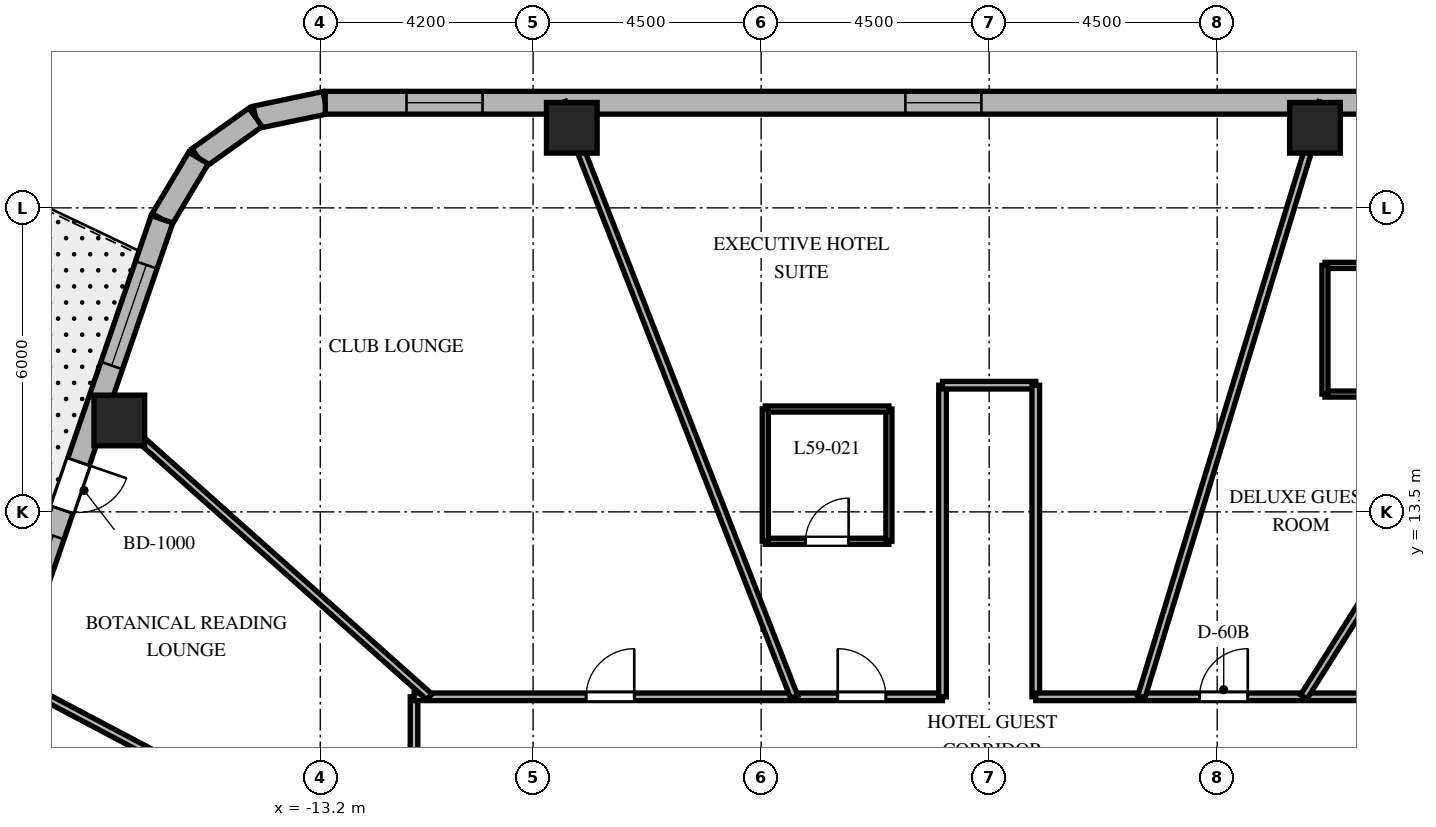
"""IFC4 building model, lengths in metres.
Left out: names, types, materials, properties, quantities, classifications, styles, units other than length and angle.
Written with IfcOpenShell. Run it as: python <this file> out.ifc"""

import sys

from ifc_helpers import new_model, si_unit, direction, frame, frame_2d, origin, origin_2d, place, context, subcontext, project, spatial, rectangle, extrude, element, fill, save


model = new_model("IFC4")
c1 = context("Model", 3, precision=1e-05, world=origin(), true_north=direction((0.0, 1.0)))
c2 = subcontext(c1, "Body", "Model", "MODEL_VIEW")
j1 = project(units=[si_unit("LENGTHUNIT", "METRE"), si_unit("PLANEANGLEUNIT", "RADIAN")], contexts=[c1])
p1 = place(None, origin())
s1 = spatial("IfcSite", under=j1, at=p1, CompositionType="ELEMENT")
p2 = place(p1, origin())
s2 = spatial("IfcBuilding", under=s1, at=p2, CompositionType="ELEMENT")
p3 = place(p2, frame((0.0, 0.0, 236.9)))
s3 = spatial("IfcBuildingStorey", under=s2, at=p3, CompositionType="ELEMENT", Elevation=236.9)
for number, where, z_axis, x_axis in (
    (1, (6.43, 21.08, 0.0), (0.0, 0.0, 1.0), (1.0, 0.0, 0.0)),
    (2, (-8.236, 21.08, 0.0), (0.0, 0.0, 1.0), (1.0, 0.0, 0.0)),
    (3, (-17.166, 15.304, 0.0), (0.0, 0.0, 1.0), (1.0, 0.0, 0.0)),
):
    element("IfcColumn", number, at=place(p3, frame(where, z_axis=z_axis, x_axis=x_axis)), inside=s3, PredefinedType="COLUMN", context=c2, shape_type="SweptSolid", body=[
        extrude(rectangle(XDim=1.0, YDim=1.0, at=origin_2d()), origin(), (0.0, 0.0, 1.0), 3.8),
    ])
p4 = place(p3, frame((-13.102, 21.575, 0.0), z_axis=(0.0, 0.0, 1.0), x_axis=(-0.978757421505, -0.205021730188, 0.0)))
e4 = element("IfcWall", 4, at=p4, inside=s3, PredefinedType="SOLIDWALL", context=c2, shape_type="SweptSolid", body=[
    extrude(rectangle(XDim=1.406, YDim=0.45, at=frame_2d((0.703, 0.0))), origin(), (0.0, 0.0, 1.0), 3.5),
])
p5 = place(p3, frame((-14.478, 21.287, 0.0), z_axis=(0.0, 0.0, 1.0), x_axis=(-0.813888518617, -0.58102106611, 0.0)))
e5 = element("IfcWall", 5, at=p5, inside=s3, PredefinedType="SOLIDWALL", context=c2, shape_type="SweptSolid", body=[
    extrude(rectangle(XDim=1.383, YDim=0.45, at=frame_2d((0.691, 0.0))), origin(), (0.0, 0.0, 1.0), 3.5),
])
p6 = place(p3, frame((-15.604, 20.483, 0.0), z_axis=(0.0, 0.0, 1.0), x_axis=(-0.512222149036, -0.858852996756, 0.0)))
e6 = element("IfcWall", 6, at=p6, inside=s3, PredefinedType="SOLIDWALL", context=c2, shape_type="SweptSolid", body=[
    extrude(rectangle(XDim=1.406, YDim=0.45, at=frame_2d((0.703, 0.0))), origin(), (0.0, 0.0, 1.0), 3.5),
])
p7 = place(p3, frame((11.298, 21.575, 0.0), z_axis=(0.0, 0.0, 1.0), x_axis=(-1.0, 0.0, 0.0)))
e7 = element("IfcWall", 7, at=p7, inside=s3, PredefinedType="SOLIDWALL", context=c2, shape_type="SweptSolid", body=[
    extrude(rectangle(XDim=24.399, YDim=0.45, at=frame_2d((12.2, 0.0))), origin(), (0.0, 0.0, 1.0), 3.5),
])
p8 = place(p7, frame((1.604, 0.0, 0.8)))
e8 = element("IfcOpeningElement", 8, at=p8, cuts=e7, PredefinedType="OPENING", context=c2, shape_type="SweptSolid", body=[
    extrude(rectangle(XDim=1.5, YDim=1.8, at=frame_2d((0.75, 0.9))), frame((0.0, 0.235, 0.0), z_axis=(0.0, -1.0, 0.0), x_axis=(1.0, 0.0, 0.0)), (0.0, 0.0, 1.0), 0.47),
])
p9 = place(p7, frame((11.451, 0.0, 0.8)))
e9 = element("IfcOpeningElement", 9, at=p9, cuts=e7, PredefinedType="OPENING", context=c2, shape_type="SweptSolid", body=[
    extrude(rectangle(XDim=1.5, YDim=1.8, at=frame_2d((0.75, 0.9))), frame((0.0, 0.235, 0.0), z_axis=(0.0, -1.0, 0.0), x_axis=(1.0, 0.0, 0.0)), (0.0, 0.0, 1.0), 0.47),
])
p10 = place(p7, frame((21.296, 0.0, 0.8)))
e10 = element("IfcOpeningElement", 10, at=p10, cuts=e7, PredefinedType="OPENING", context=c2, shape_type="SweptSolid", body=[
    extrude(rectangle(XDim=1.5, YDim=1.8, at=frame_2d((0.75, 0.9))), frame((0.0, 0.235, 0.0), z_axis=(0.0, -1.0, 0.0), x_axis=(1.0, 0.0, 0.0)), (0.0, 0.0, 1.0), 0.47),
])
p11 = place(p3, frame((-16.324, 19.275, 0.0), z_axis=(0.0, 0.0, 1.0), x_axis=(-0.325083142304, -0.945685439557, 0.0)))
e11 = element("IfcWall", 11, at=p11, inside=s3, PredefinedType="SOLIDWALL", context=c2, shape_type="SweptSolid", body=[
    extrude(rectangle(XDim=20.224, YDim=0.45, at=frame_2d((10.112, 0.0))), origin(), (0.0, 0.0, 1.0), 3.5),
])
p12 = place(p11, frame((5.062, 0.0, 0.0)))
e12 = element("IfcOpeningElement", 12, at=p12, cuts=e11, PredefinedType="OPENING", context=c2, shape_type="SweptSolid", body=[
    extrude(rectangle(XDim=1.0, YDim=2.15, at=frame_2d((0.5, 1.075))), frame((0.0, 0.235, 0.0), z_axis=(0.0, -1.0, 0.0), x_axis=(1.0, 0.0, 0.0)), (0.0, 0.0, 1.0), 0.47),
])
p13 = place(p11, frame((0.953, 0.0, 0.8)))
e13 = element("IfcOpeningElement", 13, at=p13, cuts=e11, PredefinedType="OPENING", context=c2, shape_type="SweptSolid", body=[
    extrude(rectangle(XDim=2.1, YDim=1.85, at=frame_2d((1.05, 0.925))), frame((0.0, 0.235, 0.0), z_axis=(0.0, -1.0, 0.0), x_axis=(1.0, 0.0, 0.0)), (0.0, 0.0, 1.0), 0.47),
])
p14 = place(p11, frame((6.604, 0.0, 0.8)))
e14 = element("IfcOpeningElement", 14, at=p14, cuts=e11, PredefinedType="OPENING", context=c2, shape_type="SweptSolid", body=[
    extrude(rectangle(XDim=2.1, YDim=1.85, at=frame_2d((1.05, 0.925))), frame((0.0, 0.235, 0.0), z_axis=(0.0, -1.0, 0.0), x_axis=(1.0, 0.0, 0.0)), (0.0, 0.0, 1.0), 0.47),
])
p15 = place(p11, frame((11.585, 0.0, 0.8)))
e15 = element("IfcOpeningElement", 15, at=p15, cuts=e11, PredefinedType="OPENING", context=c2, shape_type="SweptSolid", body=[
    extrude(rectangle(XDim=2.1, YDim=1.85, at=frame_2d((1.05, 0.925))), frame((0.0, 0.235, 0.0), z_axis=(0.0, -1.0, 0.0), x_axis=(1.0, 0.0, 0.0)), (0.0, 0.0, 1.0), 0.47),
])
p16 = place(p11, frame((17.118, 0.0, 0.8)))
e16 = element("IfcOpeningElement", 16, at=p16, cuts=e11, PredefinedType="OPENING", context=c2, shape_type="SweptSolid", body=[
    extrude(rectangle(XDim=2.1, YDim=1.85, at=frame_2d((1.05, 0.925))), frame((0.0, 0.235, 0.0), z_axis=(0.0, -1.0, 0.0), x_axis=(1.0, 0.0, 0.0)), (0.0, 0.0, 1.0), 0.47),
])
p17 = place(p3, frame((-11.35, 4.4, 0.0), z_axis=(0.0, 0.0, 1.0), x_axis=(0.0, 1.0, 0.0)))
e17 = element("IfcWall", 17, at=p17, inside=s3, PredefinedType="PARTITIONING", context=c2, shape_type="SweptSolid", body=[
    extrude(rectangle(XDim=5.45, YDim=0.15, at=frame_2d((2.725, 0.0))), origin(), (0.0, 0.0, 1.0), 2.99),
])
p18 = place(p17, frame((2.955, 0.0, 0.0)))
e18 = element("IfcOpeningElement", 18, at=p18, cuts=e17, PredefinedType="OPENING", context=c2, shape_type="SweptSolid", body=[
    extrude(rectangle(XDim=0.9, YDim=2.03, at=frame_2d((0.45, 1.015))), frame((0.0, 0.085, 0.0), z_axis=(0.0, -1.0, 0.0), x_axis=(1.0, 0.0, 0.0)), (0.0, 0.0, 1.0), 0.17),
])
p19 = place(p3, frame((-11.35, 9.85, 0.0), z_axis=(0.0, 0.0, 1.0), x_axis=(1.0, 0.0, 0.0)))
e19 = element("IfcWall", 19, at=p19, inside=s3, PredefinedType="PARTITIONING", context=c2, shape_type="SweptSolid", body=[
    extrude(rectangle(XDim=10.43, YDim=0.15, at=frame_2d((5.215, 0.0))), origin(), (0.0, 0.0, 1.0), 2.99),
])
p20 = place(p19, frame((8.362, 0.0, 0.0)))
e20 = element("IfcOpeningElement", 20, at=p20, cuts=e19, PredefinedType="OPENING", context=c2, shape_type="SweptSolid", body=[
    extrude(rectangle(XDim=0.95, YDim=2.03, at=frame_2d((0.475, 1.015))), frame((0.0, 0.085, 0.0), z_axis=(0.0, -1.0, 0.0), x_axis=(1.0, 0.0, 0.0)), (0.0, 0.0, 1.0), 0.17),
])
p21 = place(p19, frame((3.396, 0.0, 0.0)))
e21 = element("IfcOpeningElement", 21, at=p21, cuts=e19, PredefinedType="OPENING", context=c2, shape_type="SweptSolid", body=[
    extrude(rectangle(XDim=0.95, YDim=2.03, at=frame_2d((0.475, 1.015))), frame((0.0, 0.085, 0.0), z_axis=(0.0, -1.0, 0.0), x_axis=(1.0, 0.0, 0.0)), (0.0, 0.0, 1.0), 0.17),
])
p22 = place(p3, frame((-0.92, 9.85, 0.0), z_axis=(0.0, 0.0, 1.0), x_axis=(0.0, 1.0, 0.0)))
e22 = element("IfcWall", 22, at=p22, inside=s3, PredefinedType="PARTITIONING", context=c2, shape_type="SweptSolid", body=[
    extrude(rectangle(XDim=6.15, YDim=0.15, at=frame_2d((3.075, 0.0))), origin(), (0.0, 0.0, 1.0), 3.027),
])
p23 = place(p3, frame((-0.92, 16.0, 0.0), z_axis=(0.0, 0.0, 1.0), x_axis=(1.0, 0.0, 0.0)))
e23 = element("IfcWall", 23, at=p23, inside=s3, PredefinedType="PARTITIONING", context=c2, shape_type="SweptSolid", body=[
    extrude(rectangle(XDim=1.84, YDim=0.15, at=frame_2d((0.92, 0.0))), origin(), (0.0, 0.0, 1.0), 3.5),
])
p24 = place(p3, frame((0.92, 16.0, 0.0), z_axis=(0.0, 0.0, 1.0), x_axis=(0.0, -1.0, 0.0)))
e24 = element("IfcWall", 24, at=p24, inside=s3, PredefinedType="PARTITIONING", context=c2, shape_type="SweptSolid", body=[
    extrude(rectangle(XDim=6.15, YDim=0.15, at=frame_2d((3.075, 0.0))), origin(), (0.0, 0.0, 1.0), 3.027),
])
p25 = place(p3, frame((0.92, 9.85, 0.0), z_axis=(0.0, 0.0, 1.0), x_axis=(1.0, 0.0, 0.0)))
e25 = element("IfcWall", 25, at=p25, inside=s3, PredefinedType="PARTITIONING", context=c2, shape_type="SweptSolid", body=[
    extrude(rectangle(XDim=10.43, YDim=0.15, at=frame_2d((5.215, 0.0))), origin(), (0.0, 0.0, 1.0), 2.99),
])
p26 = place(p25, frame((6.577, 0.0, 0.0)))
e26 = element("IfcOpeningElement", 26, at=p26, cuts=e25, PredefinedType="OPENING", context=c2, shape_type="SweptSolid", body=[
    extrude(rectangle(XDim=0.9, YDim=2.03, at=frame_2d((0.45, 1.015))), frame((0.0, 0.085, 0.0), z_axis=(0.0, -1.0, 0.0), x_axis=(1.0, 0.0, 0.0)), (0.0, 0.0, 1.0), 0.17),
])
p27 = place(p25, frame((3.234, 0.0, 0.0)))
e27 = element("IfcOpeningElement", 27, at=p27, cuts=e25, PredefinedType="OPENING", context=c2, shape_type="SweptSolid", body=[
    extrude(rectangle(XDim=0.95, YDim=2.03, at=frame_2d((0.475, 1.015))), frame((0.0, 0.085, 0.0), z_axis=(0.0, -1.0, 0.0), x_axis=(1.0, 0.0, 0.0)), (0.0, 0.0, 1.0), 0.17),
])
p28 = place(p3, frame((6.21, 9.85, 0.0), z_axis=(0.0, 0.0, 1.0), x_axis=(0.533335553786, 0.84590376939, 0.0)))
e28 = element("IfcWall", 28, at=p28, inside=s3, PredefinedType="PARTITIONING", context=c2, shape_type="SweptSolid", body=[
    extrude(rectangle(XDim=12.941, YDim=0.15, at=frame_2d((6.47, 0.0))), origin(), (0.0, 0.0, 1.0), 2.74),
])
p29 = place(p3, frame((3.004, 9.85, 0.0), z_axis=(0.0, 0.0, 1.0), x_axis=(0.291775760688, 0.956486751333, 0.0)))
e29 = element("IfcWall", 29, at=p29, inside=s3, PredefinedType="PARTITIONING", context=c2, shape_type="SweptSolid", body=[
    extrude(rectangle(XDim=12.258, YDim=0.15, at=frame_2d((6.129, 0.0))), origin(), (0.0, 0.0, 1.0), 2.74),
])
p30 = place(p3, frame((-3.848, 9.85, 0.0), z_axis=(0.0, 0.0, 1.0), x_axis=(-0.363921778212, 0.931429513889, 0.0)))
e30 = element("IfcWall", 30, at=p30, inside=s3, PredefinedType="PARTITIONING", context=c2, shape_type="SweptSolid", body=[
    extrude(rectangle(XDim=12.588, YDim=0.15, at=frame_2d((6.294, 0.0))), origin(), (0.0, 0.0, 1.0), 2.74),
])
p31 = place(p3, frame((-11.048, 9.85, 0.0), z_axis=(0.0, 0.0, 1.0), x_axis=(-0.746444434655, 0.665447748492, 0.0)))
e31 = element("IfcWall", 31, at=p31, inside=s3, PredefinedType="PARTITIONING", context=c2, shape_type="SweptSolid", body=[
    extrude(rectangle(XDim=8.732, YDim=0.15, at=frame_2d((4.366, 0.0))), origin(), (0.0, 0.0, 1.0), 2.74),
])
p32 = place(p3, frame((-11.35, 5.999, 0.0), z_axis=(0.0, 0.0, 1.0), x_axis=(-0.884112301724, 0.467274478161, 0.0)))
e32 = element("IfcWall", 32, at=p32, inside=s3, PredefinedType="PARTITIONING", context=c2, shape_type="SweptSolid", body=[
    extrude(rectangle(XDim=9.129, YDim=0.15, at=frame_2d((4.564, 0.0))), origin(), (0.0, 0.0, 1.0), 2.74),
])
p33 = place(p3, frame((6.627, 15.825, 0.0), z_axis=(0.0, 0.0, 1.0), x_axis=(1.0, 0.0, 0.0)))
e33 = element("IfcWall", 33, at=p33, inside=s3, PredefinedType="PARTITIONING", context=c2, shape_type="SweptSolid", body=[
    extrude(rectangle(XDim=2.68, YDim=0.12, at=frame_2d((1.34, 0.0))), origin(), (0.0, 0.0, 1.0), 3.073),
])
p34 = place(p33, frame((0.915, 0.0, 0.0)))
e34 = element("IfcOpeningElement", 34, at=p34, cuts=e33, PredefinedType="OPENING", context=c2, shape_type="SweptSolid", body=[
    extrude(rectangle(XDim=0.85, YDim=2.03, at=frame_2d((0.425, 1.015))), frame((0.0, 0.07, 0.0), z_axis=(0.0, -1.0, 0.0), x_axis=(1.0, 0.0, 0.0)), (0.0, 0.0, 1.0), 0.14),
])
p35 = place(p3, frame((9.307, 18.365, 0.0), z_axis=(0.0, 0.0, 1.0), x_axis=(-1.0, 0.0, 0.0)))
e35 = element("IfcWall", 35, at=p35, inside=s3, PredefinedType="PARTITIONING", context=c2, shape_type="SweptSolid", body=[
    extrude(rectangle(XDim=2.68, YDim=0.12, at=frame_2d((1.34, 0.0))), origin(), (0.0, 0.0, 1.0), 3.5),
])
p36 = place(p3, frame((6.627, 18.365, 0.0), z_axis=(0.0, 0.0, 1.0), x_axis=(0.0, -1.0, 0.0)))
e36 = element("IfcWall", 36, at=p36, inside=s3, PredefinedType="PARTITIONING", context=c2, shape_type="SweptSolid", body=[
    extrude(rectangle(XDim=2.54, YDim=0.12, at=frame_2d((1.27, 0.0))), origin(), (0.0, 0.0, 1.0), 3.073),
])
p37 = place(p3, frame((-4.418, 12.92, 0.0), z_axis=(0.0, 0.0, 1.0), x_axis=(1.0, 0.0, 0.0)))
e37 = element("IfcWall", 37, at=p37, inside=s3, PredefinedType="PARTITIONING", context=c2, shape_type="SweptSolid", body=[
    extrude(rectangle(XDim=2.44, YDim=0.12, at=frame_2d((1.22, 0.0))), origin(), (0.0, 0.0, 1.0), 3.5),
])
p38 = place(p37, frame((0.795, 0.0, 0.0)))
e38 = element("IfcOpeningElement", 38, at=p38, cuts=e37, PredefinedType="OPENING", context=c2, shape_type="SweptSolid", body=[
    extrude(rectangle(XDim=0.85, YDim=2.03, at=frame_2d((0.425, 1.015))), frame((0.0, 0.07, 0.0), z_axis=(0.0, -1.0, 0.0), x_axis=(1.0, 0.0, 0.0)), (0.0, 0.0, 1.0), 0.14),
])
p39 = place(p3, frame((-1.978, 12.92, 0.0), z_axis=(0.0, 0.0, 1.0), x_axis=(0.0, 1.0, 0.0)))
e39 = element("IfcWall", 39, at=p39, inside=s3, PredefinedType="PARTITIONING", context=c2, shape_type="SweptSolid", body=[
    extrude(rectangle(XDim=2.61, YDim=0.12, at=frame_2d((1.305, 0.0))), origin(), (0.0, 0.0, 1.0), 3.027),
])
p40 = place(p3, frame((-1.978, 15.53, 0.0), z_axis=(0.0, 0.0, 1.0), x_axis=(-1.0, 0.0, 0.0)))
e40 = element("IfcWall", 40, at=p40, inside=s3, PredefinedType="PARTITIONING", context=c2, shape_type="SweptSolid", body=[
    extrude(rectangle(XDim=2.44, YDim=0.12, at=frame_2d((1.22, 0.0))), origin(), (0.0, 0.0, 1.0), 3.5),
])
p41 = place(p3, frame((-4.418, 15.53, 0.0), z_axis=(0.0, 0.0, 1.0), x_axis=(0.0, -1.0, 0.0)))
e41 = element("IfcWall", 41, at=p41, inside=s3, PredefinedType="PARTITIONING", context=c2, shape_type="SweptSolid", body=[
    extrude(rectangle(XDim=2.61, YDim=0.12, at=frame_2d((1.305, 0.0))), origin(), (0.0, 0.0, 1.0), 3.027),
])
p42 = place(p9, origin())
e42 = element("IfcWindow", 42, at=p42, inside=s3, PartitioningType="SINGLE_PANEL", PredefinedType="WINDOW", context=c2, shape_type="SweptSolid", body=[
    extrude(rectangle(XDim=1.5, YDim=1.8, at=frame_2d((0.75, 0.9))), frame((0.0, 0.03, 0.0), z_axis=(0.0, -1.0, 0.0), x_axis=(1.0, 0.0, 0.0)), (0.0, 0.0, 1.0), 0.06),
])
fill(e9, e42)
p43 = place(p10, origin())
e43 = element("IfcWindow", 43, at=p43, inside=s3, PartitioningType="SINGLE_PANEL", PredefinedType="WINDOW", context=c2, shape_type="SweptSolid", body=[
    extrude(rectangle(XDim=1.5, YDim=1.8, at=frame_2d((0.75, 0.9))), frame((0.0, 0.03, 0.0), z_axis=(0.0, -1.0, 0.0), x_axis=(1.0, 0.0, 0.0)), (0.0, 0.0, 1.0), 0.06),
])
fill(e10, e43)
p44 = place(p12, origin())
e44 = element("IfcDoor", 44, at=p44, inside=s3, OperationType="SINGLE_SWING_LEFT", PredefinedType="DOOR", context=c2, shape_type="SweptSolid", body=[
    extrude(rectangle(XDim=1.0, YDim=2.15, at=frame_2d((0.5, 1.075))), frame((0.0, 0.025, 0.0), z_axis=(0.0, -1.0, 0.0), x_axis=(1.0, 0.0, 0.0)), (0.0, 0.0, 1.0), 0.05),
])
fill(e12, e44)
p45 = place(p13, origin())
e45 = element("IfcWindow", 45, at=p45, inside=s3, PartitioningType="SINGLE_PANEL", PredefinedType="WINDOW", context=c2, shape_type="SweptSolid", body=[
    extrude(rectangle(XDim=2.1, YDim=1.85, at=frame_2d((1.05, 0.925))), frame((0.0, 0.03, 0.0), z_axis=(0.0, -1.0, 0.0), x_axis=(1.0, 0.0, 0.0)), (0.0, 0.0, 1.0), 0.06),
])
fill(e13, e45)
p46 = place(p14, origin())
e46 = element("IfcWindow", 46, at=p46, inside=s3, PartitioningType="SINGLE_PANEL", PredefinedType="WINDOW", context=c2, shape_type="SweptSolid", body=[
    extrude(rectangle(XDim=2.1, YDim=1.85, at=frame_2d((1.05, 0.925))), frame((0.0, 0.03, 0.0), z_axis=(0.0, -1.0, 0.0), x_axis=(1.0, 0.0, 0.0)), (0.0, 0.0, 1.0), 0.06),
])
fill(e14, e46)
p47 = place(p27, origin())
e47 = element("IfcDoor", 47, at=p47, inside=s3, OperationType="SINGLE_SWING_RIGHT", PredefinedType="DOOR", context=c2, shape_type="SweptSolid", body=[
    extrude(rectangle(XDim=0.95, YDim=2.03, at=frame_2d((0.475, 1.015))), frame((0.0, 0.025, 0.0), z_axis=(0.0, -1.0, 0.0), x_axis=(1.0, 0.0, 0.0)), (0.0, 0.0, 1.0), 0.05),
])
fill(e27, e47)
p48 = place(p20, origin())
e48 = element("IfcDoor", 48, at=p48, inside=s3, OperationType="SINGLE_SWING_LEFT", PredefinedType="DOOR", context=c2, shape_type="SweptSolid", body=[
    extrude(rectangle(XDim=0.95, YDim=2.03, at=frame_2d((0.475, 1.015))), frame((0.0, 0.025, 0.0), z_axis=(0.0, -1.0, 0.0), x_axis=(1.0, 0.0, 0.0)), (0.0, 0.0, 1.0), 0.05),
])
fill(e20, e48)
p49 = place(p38, origin())
e49 = element("IfcDoor", 49, at=p49, inside=s3, OperationType="SINGLE_SWING_RIGHT", PredefinedType="DOOR", context=c2, shape_type="SweptSolid", body=[
    extrude(rectangle(XDim=0.85, YDim=2.03, at=frame_2d((0.425, 1.015))), frame((0.0, 0.025, 0.0), z_axis=(0.0, -1.0, 0.0), x_axis=(1.0, 0.0, 0.0)), (0.0, 0.0, 1.0), 0.05),
])
fill(e38, e49)
p50 = place(p21, origin())
e50 = element("IfcDoor", 50, at=p50, inside=s3, OperationType="SINGLE_SWING_RIGHT", PredefinedType="DOOR", context=c2, shape_type="SweptSolid", body=[
    extrude(rectangle(XDim=0.95, YDim=2.03, at=frame_2d((0.475, 1.015))), frame((0.0, 0.025, 0.0), z_axis=(0.0, -1.0, 0.0), x_axis=(1.0, 0.0, 0.0)), (0.0, 0.0, 1.0), 0.05),
])
fill(e21, e50)
save(model, sys.argv[1])
